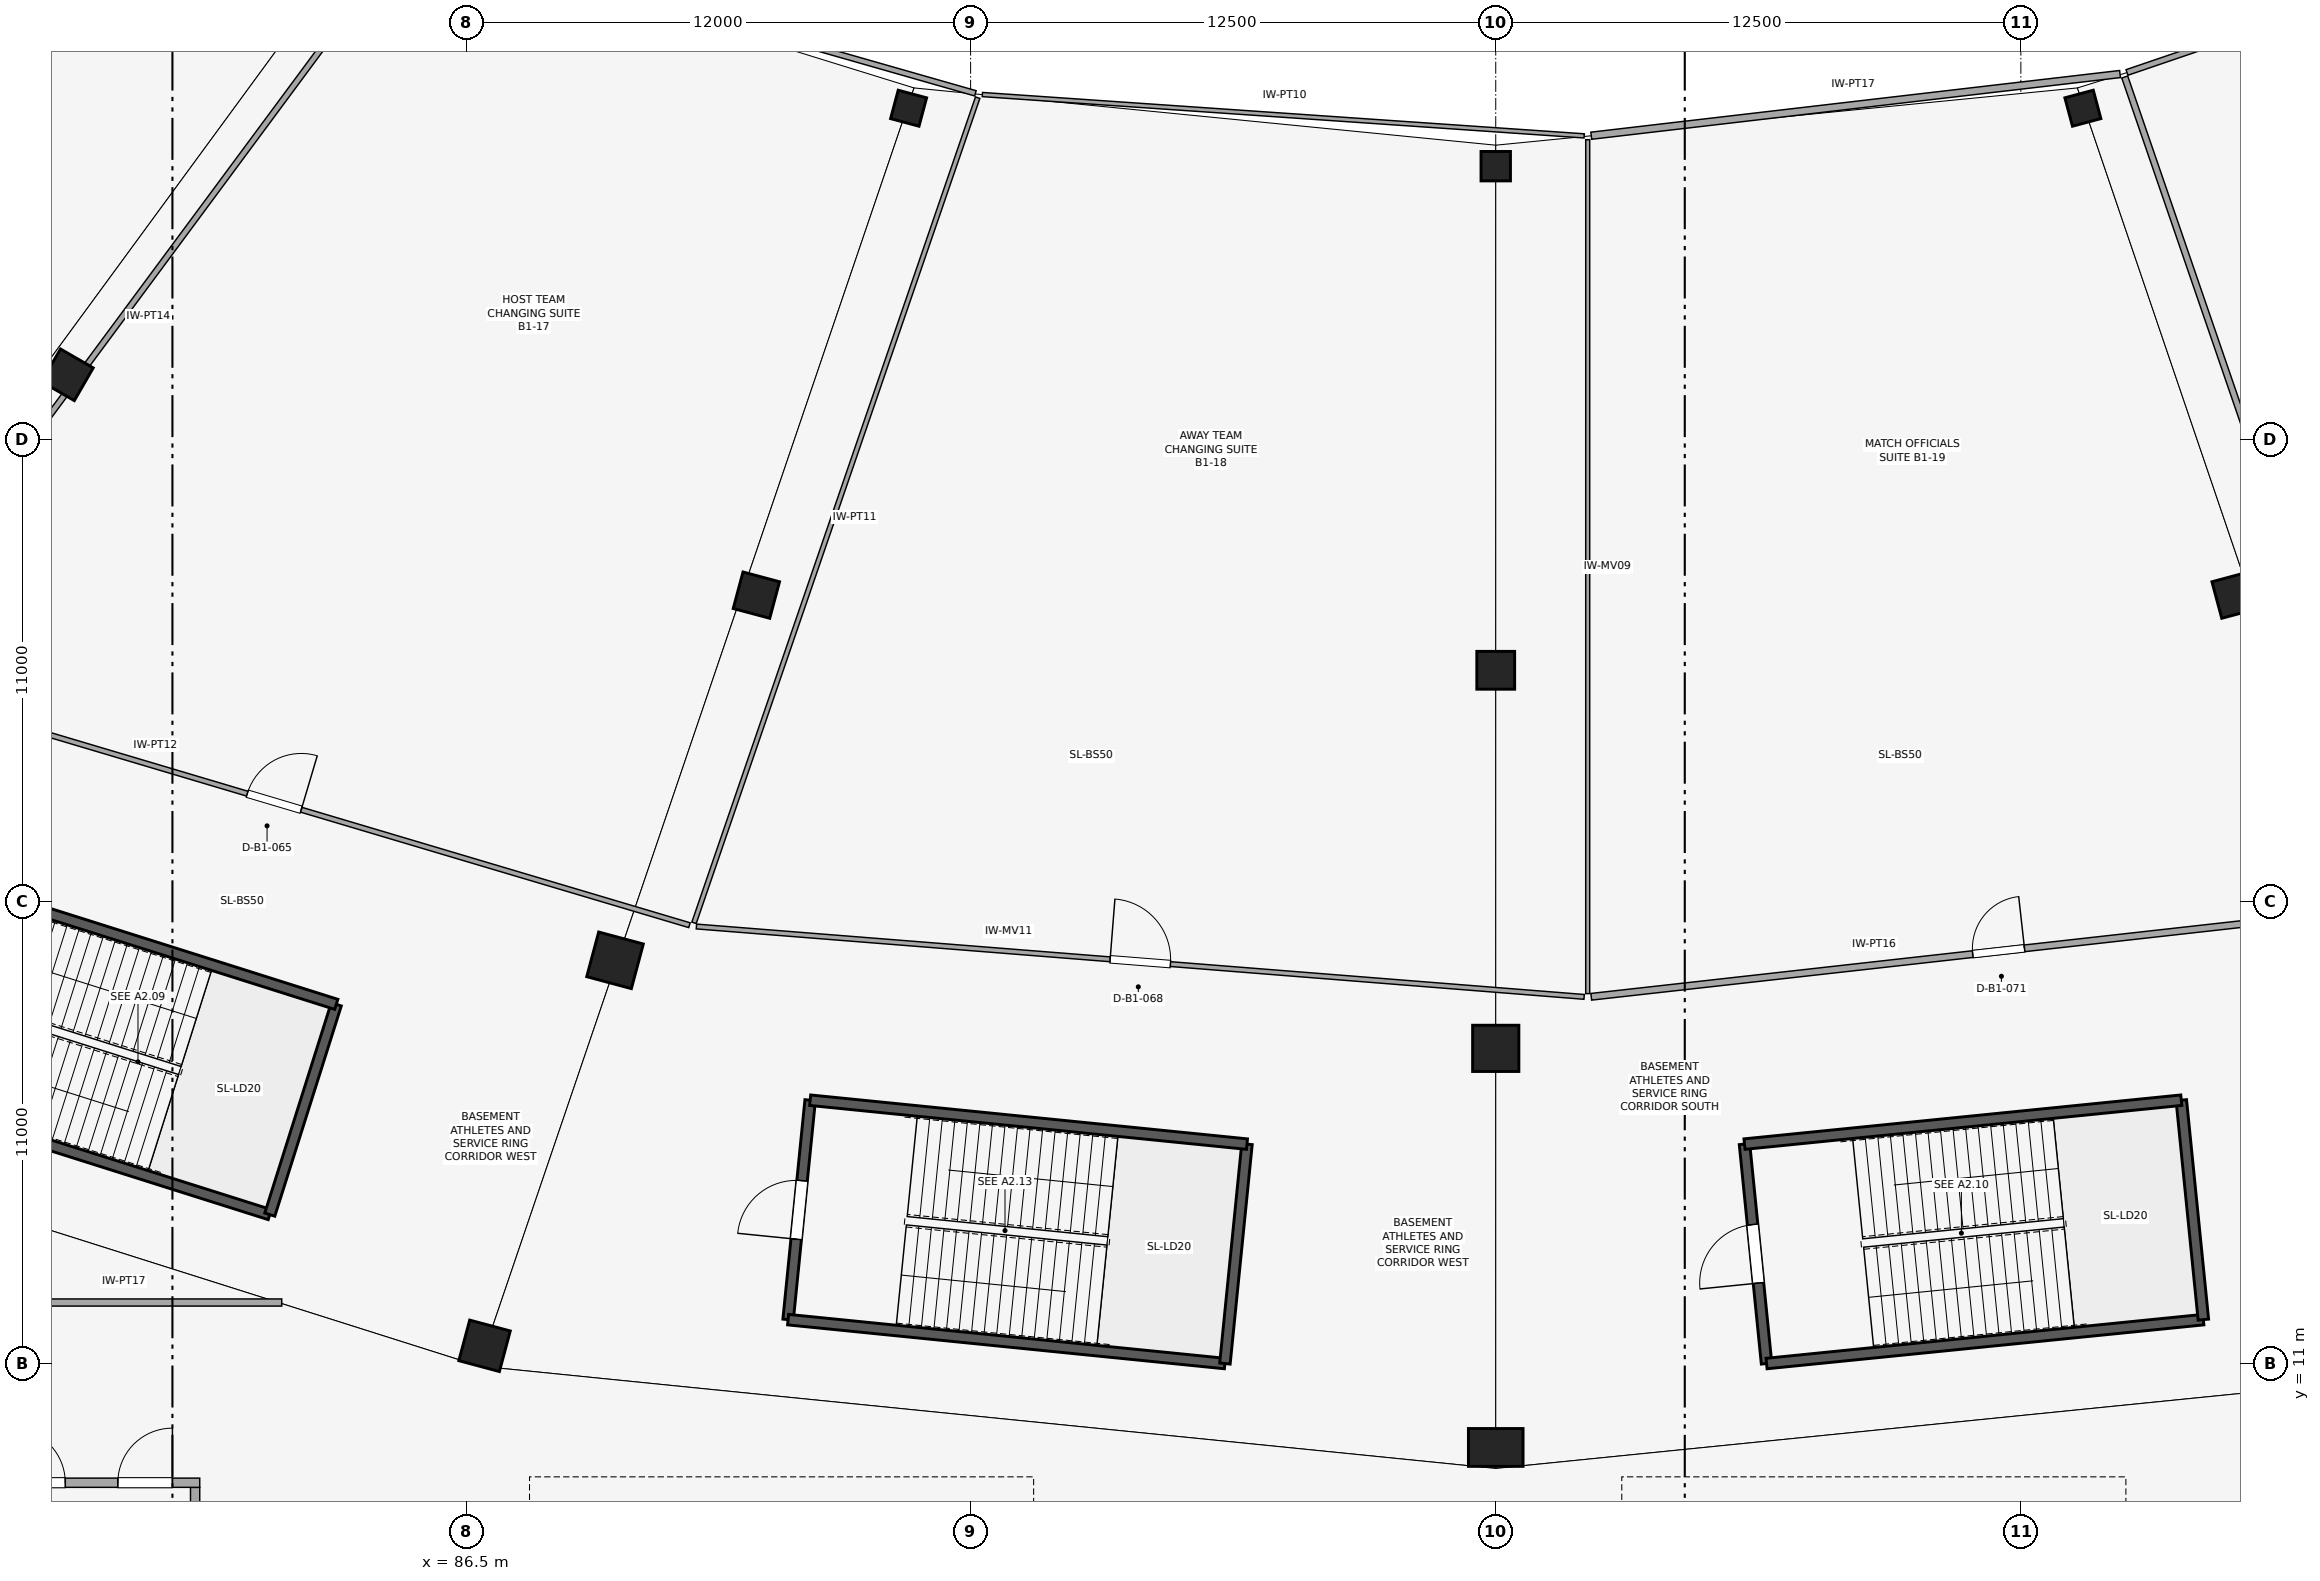
"""IFC4 building model, lengths in metres.
Left out: names, types, materials, properties, quantities, classifications, styles, units other than length and angle.
Written with IfcOpenShell. Run it as: python <this file> out.ifc"""

import sys

from ifc_helpers import new_model, si_unit, direction, frame, frame_2d, origin, origin_2d, place, context, subcontext, project, spatial, rectangle, extrude, element, fill, save


model = new_model("IFC4")
c1 = context("Model", 3, precision=1e-05, world=origin(), true_north=direction((0.0, 1.0)))
c2 = subcontext(c1, "Body", "Model", "MODEL_VIEW")
j1 = project(units=[si_unit("LENGTHUNIT", "METRE"), si_unit("PLANEANGLEUNIT", "RADIAN")], contexts=[c1])
p1 = place(None, origin())
s1 = spatial("IfcSite", under=j1, at=p1, CompositionType="ELEMENT")
p2 = place(p1, origin())
s2 = spatial("IfcBuilding", under=s1, at=p2, CompositionType="ELEMENT")
p3 = place(p2, frame((0.0, 0.0, -5.4)))
s3 = spatial("IfcBuildingStorey", under=s2, at=p3, CompositionType="ELEMENT", Elevation=-5.4)
for number, where, z_axis, x_axis in (
    (1, (97.024, 40.88, 0.0), (0.0, 0.0, 1.0), (-0.259, -0.966, 0.0)),
    (2, (111.0, 39.5, 0.0), (0.0, 0.0, 1.0), (0.0, -1.0, 0.0)),
    (3, (124.976, 40.88, 0.0), (0.0, 0.0, 1.0), (0.259, -0.966, 0.0)),
):
    element("IfcColumn", number, at=place(p3, frame(where, z_axis=z_axis, x_axis=x_axis)), inside=s3, PredefinedType="COLUMN", context=c2, shape_type="SweptSolid", body=[
        extrude(rectangle(XDim=0.7, YDim=0.7, at=origin_2d()), origin(), (0.0, 0.0, 1.0), 5.4),
    ])
for number, where, z_axis, x_axis in (
    (4, (77.0, 34.534, 0.0), (0.0, 0.0, 1.0), (-0.5, -0.866, 0.0)),
    (5, (93.4, 29.289, 0.0), (0.0, 0.0, 1.0), (-0.259, -0.966, 0.0)),
    (6, (111.0, 27.5, 0.0), (0.0, 0.0, 1.0), (0.0, -1.0, 0.0)),
    (7, (128.6, 29.289, 0.0), (0.0, 0.0, 1.0), (0.259, -0.966, 0.0)),
):
    element("IfcColumn", number, at=place(p3, frame(where, z_axis=z_axis, x_axis=x_axis)), inside=s3, PredefinedType="COLUMN", context=c2, shape_type="SweptSolid", body=[
        extrude(rectangle(XDim=0.9, YDim=0.9, at=origin_2d()), origin(), (0.0, 0.0, 1.0), 5.4),
    ])
for number, where, z_axis, x_axis in (
    (8, (90.036, 20.596, 0.0), (0.0, 0.0, 1.0), (-0.259, -0.966, 0.0)),
    (9, (111.0, 18.5, 0.0), (0.0, 0.0, 1.0), (0.0, -1.0, 0.0)),
):
    element("IfcColumn", number, at=place(p3, frame(where, z_axis=z_axis, x_axis=x_axis)), inside=s3, PredefinedType="COLUMN", context=c2, shape_type="SweptSolid", body=[
        extrude(rectangle(XDim=1.1, YDim=1.1, at=origin_2d()), origin(), (0.0, 0.0, 1.0), 5.4),
    ])
p4 = place(p3, frame((86.93, 11.419, 0.0), z_axis=(0.0, 0.0, 1.0), x_axis=(-0.258819045103, -0.965925826289, 0.0)))
e10 = element("IfcColumn", 10, at=p4, inside=s3, PredefinedType="COLUMN", context=c2, shape_type="SweptSolid", body=[
    extrude(rectangle(XDim=1.0, YDim=1.0, at=origin_2d()), origin(), (0.0, 0.0, 1.0), 5.4),
])
p5 = place(p3, frame((111.0, 9.0, 0.0), z_axis=(0.0, 0.0, 1.0), x_axis=(0.0, -1.0, 0.0)))
e11 = element("IfcColumn", 11, at=p5, inside=s3, PredefinedType="COLUMN", context=c2, shape_type="SweptSolid", body=[
    extrude(rectangle(XDim=0.9, YDim=1.3, at=origin_2d()), origin(), (0.0, 0.0, 1.0), 5.4),
])
p6 = place(p3, frame((71.854, 17.693, 0.0), z_axis=(0.0, 0.0, 1.0), x_axis=(0.953461834254, -0.301513732061, 0.0)))
e12 = element("IfcWall", 12, at=p6, inside=s3, PredefinedType="SHEAR", context=c2, shape_type="SweptSolid", body=[
    extrude(rectangle(XDim=10.45, YDim=0.25, at=frame_2d((5.225, 0.0))), origin(), (0.0, 0.0, 1.0), 5.05),
])
p7 = place(p3, frame((81.818, 14.542, 0.0), z_axis=(0.0, 0.0, 1.0), x_axis=(0.301485222482, 0.953470849384, 0.0)))
e13 = element("IfcWall", 13, at=p7, inside=s3, PredefinedType="SHEAR", context=c2, shape_type="SweptSolid", body=[
    extrude(rectangle(XDim=5.25, YDim=0.25, at=frame_2d((2.625, 0.0))), origin(), (0.0, 0.0, 1.0), 5.05),
])
p8 = place(p3, frame((83.4, 19.548, 0.0), z_axis=(0.0, 0.0, 1.0), x_axis=(-0.953459710305, 0.301520448438, 0.0)))
e14 = element("IfcWall", 14, at=p8, inside=s3, PredefinedType="SHEAR", context=c2, shape_type="SweptSolid", body=[
    extrude(rectangle(XDim=10.45, YDim=0.25, at=frame_2d((5.225, 0.0))), origin(), (0.0, 0.0, 1.0), 5.05),
])
p9 = place(p3, frame((116.921, 16.221, 0.0), z_axis=(0.0, 0.0, 1.0), x_axis=(0.100028593886, -0.994984562898, 0.0)))
e15 = element("IfcWall", 15, at=p9, inside=s3, PredefinedType="SHEAR", context=c2, shape_type="SweptSolid", body=[
    extrude(rectangle(XDim=5.25, YDim=0.25, at=frame_2d((2.625, 0.0))), origin(), (0.0, 0.0, 1.0), 5.05),
])
p10 = place(p9, frame((1.925, 0.0, 0.0)))
e16 = element("IfcOpeningElement", 16, at=p10, cuts=e15, PredefinedType="OPENING", context=c2, shape_type="SweptSolid", body=[
    extrude(rectangle(XDim=1.4, YDim=2.2, at=frame_2d((0.7, 1.1))), frame((0.0, 0.135, 0.0), z_axis=(0.0, -1.0, 0.0), x_axis=(1.0, 0.0, 0.0)), (0.0, 0.0, 1.0), 0.27),
])
p11 = place(p3, frame((117.447, 10.997, 0.0), z_axis=(0.0, 0.0, 1.0), x_axis=(0.994985938948, 0.100014905366, 0.0)))
e17 = element("IfcWall", 17, at=p11, inside=s3, PredefinedType="SHEAR", context=c2, shape_type="SweptSolid", body=[
    extrude(rectangle(XDim=10.45, YDim=0.25, at=frame_2d((5.225, 0.0))), origin(), (0.0, 0.0, 1.0), 5.05),
])
p12 = place(p3, frame((127.844, 12.042, 0.0), z_axis=(0.0, 0.0, 1.0), x_axis=(-0.100028593886, 0.994984562898, 0.0)))
e18 = element("IfcWall", 18, at=p12, inside=s3, PredefinedType="SHEAR", context=c2, shape_type="SweptSolid", body=[
    extrude(rectangle(XDim=5.25, YDim=0.25, at=frame_2d((2.625, 0.0))), origin(), (0.0, 0.0, 1.0), 5.05),
])
p13 = place(p3, frame((127.319, 17.266, 0.0), z_axis=(0.0, 0.0, 1.0), x_axis=(-0.994985938948, -0.100014905366, 0.0)))
e19 = element("IfcWall", 19, at=p13, inside=s3, PredefinedType="SHEAR", context=c2, shape_type="SweptSolid", body=[
    extrude(rectangle(XDim=10.45, YDim=0.25, at=frame_2d((5.225, 0.0))), origin(), (0.0, 0.0, 1.0), 5.05),
])
p14 = place(p3, frame((94.681, 17.266, 0.0), z_axis=(0.0, 0.0, 1.0), x_axis=(-0.10002396577, -0.994985028165, 0.0)))
e20 = element("IfcWall", 20, at=p14, inside=s3, PredefinedType="SHEAR", context=c2, shape_type="SweptSolid", body=[
    extrude(rectangle(XDim=5.25, YDim=0.25, at=frame_2d((2.625, 0.0))), origin(), (0.0, 0.0, 1.0), 5.05),
])
p15 = place(p14, frame((1.925, 0.0, 0.0)))
e21 = element("IfcOpeningElement", 21, at=p15, cuts=e20, PredefinedType="OPENING", context=c2, shape_type="SweptSolid", body=[
    extrude(rectangle(XDim=1.4, YDim=2.2, at=frame_2d((0.7, 1.1))), frame((0.0, 0.135, 0.0), z_axis=(0.0, -1.0, 0.0), x_axis=(1.0, 0.0, 0.0)), (0.0, 0.0, 1.0), 0.27),
])
p16 = place(p3, frame((94.156, 12.042, 0.0), z_axis=(0.0, 0.0, 1.0), x_axis=(0.994988263568, -0.09999177647, 0.0)))
e22 = element("IfcWall", 22, at=p16, inside=s3, PredefinedType="SHEAR", context=c2, shape_type="SweptSolid", body=[
    extrude(rectangle(XDim=10.45, YDim=0.25, at=frame_2d((5.225, 0.0))), origin(), (0.0, 0.0, 1.0), 5.05),
])
p17 = place(p3, frame((104.553, 10.997, 0.0), z_axis=(0.0, 0.0, 1.0), x_axis=(0.099982555566, 0.994989190184, 0.0)))
e23 = element("IfcWall", 23, at=p17, inside=s3, PredefinedType="SHEAR", context=c2, shape_type="SweptSolid", body=[
    extrude(rectangle(XDim=5.25, YDim=0.25, at=frame_2d((2.625, 0.0))), origin(), (0.0, 0.0, 1.0), 5.05),
])
p18 = place(p3, frame((105.078, 16.221, 0.0), z_axis=(0.0, 0.0, 1.0), x_axis=(-0.994985705245, 0.100017230303, 0.0)))
e24 = element("IfcWall", 24, at=p18, inside=s3, PredefinedType="SHEAR", context=c2, shape_type="SweptSolid", body=[
    extrude(rectangle(XDim=10.45, YDim=0.25, at=frame_2d((5.225, 0.0))), origin(), (0.0, 0.0, 1.0), 5.05),
])
p19 = place(p3, frame((80.04, 4.52, 0.0), z_axis=(0.0, 0.0, 1.0), x_axis=(0.0, 1.0, 0.0)))
e25 = element("IfcWall", 25, at=p19, inside=s3, PredefinedType="PARTITIONING", context=c2, shape_type="SweptSolid", body=[
    extrude(rectangle(XDim=3.53, YDim=0.22, at=frame_2d((1.765, 0.0))), origin(), (0.0, 0.0, 1.0), 3.8),
])
p20 = place(p3, frame((75.0, 8.16, 0.0), z_axis=(0.0, 0.0, 1.0), x_axis=(1.0, 0.0, 0.0)))
e26 = element("IfcWall", 26, at=p20, inside=s3, PredefinedType="PARTITIONING", context=c2, shape_type="SweptSolid", body=[
    extrude(rectangle(XDim=5.15, YDim=0.22, at=frame_2d((2.575, 0.0))), origin(), (0.0, 0.0, 1.0), 3.8),
])
p21 = place(p20, frame((0.65, 0.0, 0.0)))
e27 = element("IfcOpeningElement", 27, at=p21, cuts=e26, PredefinedType="OPENING", context=c2, shape_type="SweptSolid", body=[
    extrude(rectangle(XDim=1.3, YDim=2.2, at=frame_2d((0.65, 1.1))), frame((0.0, 0.12, 0.0), z_axis=(0.0, -1.0, 0.0), x_axis=(1.0, 0.0, 0.0)), (0.0, 0.0, 1.0), 0.24),
])
p22 = place(p20, frame((3.2, 0.0, 0.0)))
e28 = element("IfcOpeningElement", 28, at=p22, cuts=e26, PredefinedType="OPENING", context=c2, shape_type="SweptSolid", body=[
    extrude(rectangle(XDim=1.3, YDim=2.2, at=frame_2d((0.65, 1.1))), frame((0.0, 0.12, 0.0), z_axis=(0.0, -1.0, 0.0), x_axis=(1.0, 0.0, 0.0)), (0.0, 0.0, 1.0), 0.24),
])
p23 = place(p3, frame((85.059, 45.024, 0.0), z_axis=(0.0, 0.0, 1.0), x_axis=(-0.595164706077, -0.803603741057, 0.0)))
e29 = element("IfcWall", 29, at=p23, inside=s3, PredefinedType="PARTITIONING", context=c2, shape_type="SweptSolid", body=[
    extrude(rectangle(XDim=21.926, YDim=0.14, at=frame_2d((10.963, 0.0))), origin(), (0.0, 0.0, 1.0), 3.8),
])
p24 = place(p3, frame((85.191, 45.069, 0.0), z_axis=(0.0, 0.0, 1.0), x_axis=(0.96152988709, -0.274700338975, 0.0)))
e30 = element("IfcWall", 30, at=p24, inside=s3, PredefinedType="PARTITIONING", context=c2, shape_type="SweptSolid", body=[
    extrude(rectangle(XDim=13.96, YDim=0.13, at=frame_2d((6.98, 0.0))), origin(), (0.0, 0.0, 1.0), 3.8),
])
p25 = place(p3, frame((72.04, 27.312, 0.0), z_axis=(0.0, 0.0, 1.0), x_axis=(0.958492296074, -0.285118428668, 0.0)))
e31 = element("IfcWall", 31, at=p25, inside=s3, PredefinedType="PARTITIONING", context=c2, shape_type="SweptSolid", body=[
    extrude(rectangle(XDim=20.623, YDim=0.12, at=frame_2d((10.311, 0.0))), origin(), (0.0, 0.0, 1.0), 3.8),
])
p26 = place(p25, frame((9.641, 0.0, 0.0)))
e32 = element("IfcOpeningElement", 32, at=p26, cuts=e31, PredefinedType="OPENING", context=c2, shape_type="SweptSolid", body=[
    extrude(rectangle(XDim=1.34, YDim=2.1, at=frame_2d((0.67, 1.05))), frame((0.0, 0.07, 0.0), z_axis=(0.0, -1.0, 0.0), x_axis=(1.0, 0.0, 0.0)), (0.0, 0.0, 1.0), 0.14),
])
p27 = place(p3, frame((98.668, 41.131, 0.0), z_axis=(0.0, 0.0, 1.0), x_axis=(-0.325078783027, -0.945686938064, 0.0)))
e33 = element("IfcWall", 33, at=p27, inside=s3, PredefinedType="PARTITIONING", context=c2, shape_type="SweptSolid", body=[
    extrude(rectangle(XDim=20.771, YDim=0.11, at=frame_2d((10.385, 0.0))), origin(), (0.0, 0.0, 1.0), 3.8),
])
p28 = place(p3, frame((98.781, 41.205, 0.0), z_axis=(0.0, 0.0, 1.0), x_axis=(0.997648124088, -0.068543566467, 0.0)))
e34 = element("IfcWall", 34, at=p28, inside=s3, PredefinedType="PARTITIONING", context=c2, shape_type="SweptSolid", body=[
    extrude(rectangle(XDim=14.358, YDim=0.1, at=frame_2d((7.179, 0.0))), origin(), (0.0, 0.0, 1.0), 3.8),
])
p29 = place(p3, frame((91.973, 21.401, 0.0), z_axis=(0.0, 0.0, 1.0), x_axis=(0.996870264064, -0.079054896279, 0.0)))
e35 = element("IfcWall", 35, at=p29, inside=s3, PredefinedType="MOVABLE", context=c2, shape_type="SweptSolid", body=[
    extrude(rectangle(XDim=21.198, YDim=0.115, at=frame_2d((10.599, 0.0))), origin(), (0.0, 0.0, 1.0), 3.8),
])
p30 = place(p29, frame((9.879, 0.0, 0.0)))
e36 = element("IfcOpeningElement", 36, at=p30, cuts=e35, PredefinedType="OPENING", context=c2, shape_type="SweptSolid", body=[
    extrude(rectangle(XDim=1.44, YDim=2.24, at=frame_2d((0.72, 1.12))), frame((0.0, 0.067, 0.0), z_axis=(0.0, -1.0, 0.0), x_axis=(1.0, 0.0, 0.0)), (0.0, 0.0, 1.0), 0.135),
])
p31 = place(p3, frame((113.189, 40.131, 0.0), z_axis=(0.0, 0.0, 1.0), x_axis=(-1.2010569e-05, -0.999999999928, 0.0)))
e37 = element("IfcWall", 37, at=p31, inside=s3, PredefinedType="MOVABLE", context=c2, shape_type="SweptSolid", body=[
    extrude(rectangle(XDim=20.327, YDim=0.095, at=frame_2d((10.164, 0.0))), origin(), (0.0, 0.0, 1.0), 3.8),
])
p32 = place(p3, frame((113.274, 40.225, 0.0), z_axis=(0.0, 0.0, 1.0), x_axis=(0.993267536316, 0.11584300281, 0.0)))
e38 = element("IfcWall", 38, at=p32, inside=s3, PredefinedType="PARTITIONING", context=c2, shape_type="SweptSolid", body=[
    extrude(rectangle(XDim=12.672, YDim=0.17, at=frame_2d((6.336, 0.0))), origin(), (0.0, 0.0, 1.0), 3.8),
])
p33 = place(p3, frame((113.274, 19.728, 0.0), z_axis=(0.0, 0.0, 1.0), x_axis=(0.993803678033, 0.111149671744, 0.0)))
e39 = element("IfcWall", 39, at=p33, inside=s3, PredefinedType="PARTITIONING", context=c2, shape_type="SweptSolid", body=[
    extrude(rectangle(XDim=19.514, YDim=0.16, at=frame_2d((9.757, 0.0))), origin(), (0.0, 0.0, 1.0), 3.8),
])
p34 = place(p33, frame((9.137, 0.0, 0.0)))
e40 = element("IfcOpeningElement", 40, at=p34, cuts=e39, PredefinedType="OPENING", context=c2, shape_type="SweptSolid", body=[
    extrude(rectangle(XDim=1.24, YDim=2.1, at=frame_2d((0.62, 1.05))), frame((0.0, 0.09, 0.0), z_axis=(0.0, -1.0, 0.0), x_axis=(1.0, 0.0, 0.0)), (0.0, 0.0, 1.0), 0.18),
])
p35 = place(p3, frame((125.973, 41.623, 0.0), z_axis=(0.0, 0.0, 1.0), x_axis=(0.325102770546, -0.945678692043, 0.0)))
e41 = element("IfcWall", 41, at=p35, inside=s3, PredefinedType="PARTITIONING", context=c2, shape_type="SweptSolid", body=[
    extrude(rectangle(XDim=20.764, YDim=0.15, at=frame_2d((10.382, 0.0))), origin(), (0.0, 0.0, 1.0), 3.8),
])
p36 = place(p3, frame((126.026, 41.731, 0.0), z_axis=(0.0, 0.0, 1.0), x_axis=(0.946404215371, 0.322984614382, 0.0)))
e42 = element("IfcWall", 42, at=p36, inside=s3, PredefinedType="PARTITIONING", context=c2, shape_type="SweptSolid", body=[
    extrude(rectangle(XDim=13.999, YDim=0.14, at=frame_2d((7.0, 0.0))), origin(), (0.0, 0.0, 1.0), 3.8),
])
p37 = place(p3, frame((74.585, 12.45, 0.0), z_axis=(0.0, 0.0, 1.0), x_axis=(1.0, 0.0, 0.0)))
e43 = element("IfcWall", 43, at=p37, inside=s3, PredefinedType="PARTITIONING", context=c2, shape_type="SweptSolid", body=[
    extrude(rectangle(XDim=7.517, YDim=0.17, at=frame_2d((3.759, 0.0))), origin(), (0.0, 0.0, 1.0), 3.8),
])
p38 = place(p10, frame((1.4, 0.0, 0.0), z_axis=(0.0, 0.0, 1.0), x_axis=(-1.0, 0.0, 0.0)))
e44 = element("IfcDoor", 44, at=p38, inside=s3, OperationType="SINGLE_SWING_LEFT", PredefinedType="DOOR", context=c2, shape_type="SweptSolid", body=[
    extrude(rectangle(XDim=1.4, YDim=2.2, at=frame_2d((0.7, 1.1))), frame((0.0, 0.025, 0.0), z_axis=(0.0, -1.0, 0.0), x_axis=(1.0, 0.0, 0.0)), (0.0, 0.0, 1.0), 0.05),
])
fill(e16, e44)
p39 = place(p15, frame((1.4, 0.0, 0.0), z_axis=(0.0, 0.0, 1.0), x_axis=(-1.0, 0.0, 0.0)))
e45 = element("IfcDoor", 45, at=p39, inside=s3, OperationType="SINGLE_SWING_LEFT", PredefinedType="DOOR", context=c2, shape_type="SweptSolid", body=[
    extrude(rectangle(XDim=1.4, YDim=2.2, at=frame_2d((0.7, 1.1))), frame((0.0, 0.025, 0.0), z_axis=(0.0, -1.0, 0.0), x_axis=(1.0, 0.0, 0.0)), (0.0, 0.0, 1.0), 0.05),
])
fill(e21, e45)
p40 = place(p21, origin())
e46 = element("IfcDoor", 46, at=p40, inside=s3, OperationType="SINGLE_SWING_LEFT", PredefinedType="DOOR", context=c2, shape_type="SweptSolid", body=[
    extrude(rectangle(XDim=1.3, YDim=2.2, at=frame_2d((0.65, 1.1))), frame((0.0, 0.025, 0.0), z_axis=(0.0, -1.0, 0.0), x_axis=(1.0, 0.0, 0.0)), (0.0, 0.0, 1.0), 0.05),
])
fill(e27, e46)
p41 = place(p22, origin())
e47 = element("IfcDoor", 47, at=p41, inside=s3, OperationType="SINGLE_SWING_RIGHT", PredefinedType="DOOR", context=c2, shape_type="SweptSolid", body=[
    extrude(rectangle(XDim=1.3, YDim=2.2, at=frame_2d((0.65, 1.1))), frame((0.0, 0.025, 0.0), z_axis=(0.0, -1.0, 0.0), x_axis=(1.0, 0.0, 0.0)), (0.0, 0.0, 1.0), 0.05),
])
fill(e28, e47)
p42 = place(p26, origin())
e48 = element("IfcDoor", 48, at=p42, inside=s3, OperationType="SINGLE_SWING_RIGHT", PredefinedType="DOOR", context=c2, shape_type="SweptSolid", body=[
    extrude(rectangle(XDim=1.34, YDim=2.1, at=frame_2d((0.67, 1.05))), frame((0.0, 0.025, 0.0), z_axis=(0.0, -1.0, 0.0), x_axis=(1.0, 0.0, 0.0)), (0.0, 0.0, 1.0), 0.05),
])
fill(e32, e48)
p43 = place(p30, origin())
e49 = element("IfcDoor", 49, at=p43, inside=s3, OperationType="SINGLE_SWING_LEFT", PredefinedType="DOOR", context=c2, shape_type="SweptSolid", body=[
    extrude(rectangle(XDim=1.44, YDim=2.24, at=frame_2d((0.72, 1.12))), frame((0.0, 0.025, 0.0), z_axis=(0.0, -1.0, 0.0), x_axis=(1.0, 0.0, 0.0)), (0.0, 0.0, 1.0), 0.05),
])
fill(e36, e49)
p44 = place(p34, origin())
e50 = element("IfcDoor", 50, at=p44, inside=s3, OperationType="SINGLE_SWING_RIGHT", PredefinedType="DOOR", context=c2, shape_type="SweptSolid", body=[
    extrude(rectangle(XDim=1.24, YDim=2.1, at=frame_2d((0.62, 1.05))), frame((0.0, 0.025, 0.0), z_axis=(0.0, -1.0, 0.0), x_axis=(1.0, 0.0, 0.0)), (0.0, 0.0, 1.0), 0.05),
])
fill(e40, e50)
save(model, sys.argv[1])
